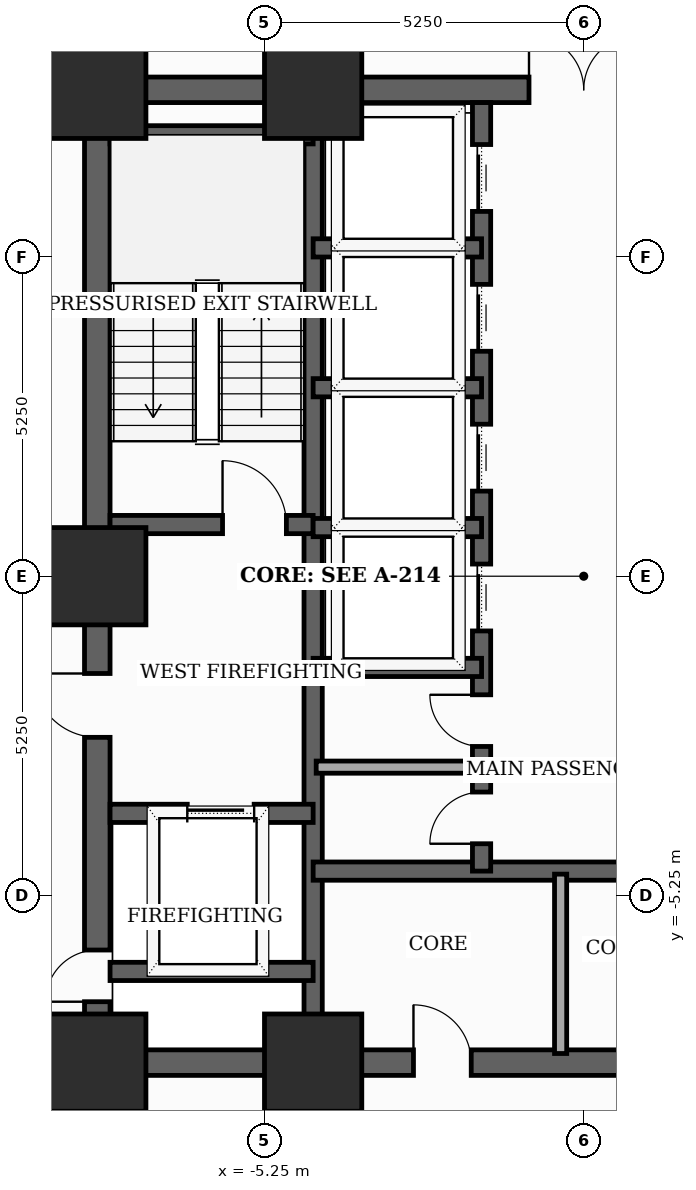
"""IFC4 building model, lengths in metres.
Left out: names, types, materials, properties, quantities, classifications, styles, units other than length and angle.
Written with IfcOpenShell. Run it as: python <this file> out.ifc"""

import sys

from ifc_helpers import new_model, si_unit, direction, frame, frame_2d, origin, origin_2d, place, context, subcontext, project, spatial, rectangle, extrude, element, fill, save


model = new_model("IFC4")
c1 = context("Model", 3, precision=1e-05, world=origin(), true_north=direction((0.0, 1.0)))
c2 = subcontext(c1, "Body", "Model", "MODEL_VIEW")
j1 = project(units=[si_unit("LENGTHUNIT", "METRE"), si_unit("PLANEANGLEUNIT", "RADIAN")], contexts=[c1])
p1 = place(None, origin())
s1 = spatial("IfcSite", under=j1, at=p1, CompositionType="ELEMENT")
p2 = place(p1, origin())
s2 = spatial("IfcBuilding", under=s1, at=p2, CompositionType="ELEMENT")
p3 = place(p2, frame((0.0, 0.0, 63.0)))
s3 = spatial("IfcBuildingStorey", under=s2, at=p3, CompositionType="ELEMENT", Elevation=63.0)
for number, where, z_axis, x_axis in (
    (1, (-8.0, -8.0, 0.0), (0.0, 0.0, 1.0), (1.0, 0.0, 0.0)),
    (2, (-4.45, -8.0, 0.0), (0.0, 0.0, 1.0), (1.0, 0.0, 0.0)),
    (3, (-4.45, 8.0, 0.0), (0.0, 0.0, 1.0), (1.0, 0.0, 0.0)),
    (4, (-8.0, 8.0, 0.0), (0.0, 0.0, 1.0), (1.0, 0.0, 0.0)),
    (5, (-8.0, 0.0, 0.0), (0.0, 0.0, 1.0), (1.0, 0.0, 0.0)),
):
    element("IfcColumn", number, at=place(p3, frame(where, z_axis=z_axis, x_axis=x_axis)), inside=s3, PredefinedType="COLUMN", context=c2, shape_type="SweptSolid", body=[
        extrude(rectangle(XDim=1.6, YDim=1.6, at=origin_2d()), origin(), (0.0, 0.0, 1.0), 3.7),
    ])
p4 = place(p3, frame((-8.0, -8.0, 0.0), z_axis=(0.0, 0.0, 1.0), x_axis=(0.0, 1.0, 0.0)))
e6 = element("IfcWall", 6, at=p4, inside=s3, PredefinedType="SHEAR", context=c2, shape_type="SweptSolid", body=[
    extrude(rectangle(XDim=16.0, YDim=0.42, at=frame_2d((8.0, 0.0))), origin(), (0.0, 0.0, 1.0), 3.5),
])
p5 = place(p4, frame((1.002, 0.0, 0.0)))
e7 = element("IfcOpeningElement", 7, at=p5, cuts=e6, PredefinedType="OPENING", context=c2, shape_type="SweptSolid", body=[
    extrude(rectangle(XDim=0.85, YDim=2.02, at=frame_2d((0.425, 1.01))), frame((0.0, 0.22, 0.0), z_axis=(0.0, -1.0, 0.0), x_axis=(1.0, 0.0, 0.0)), (0.0, 0.0, 1.0), 0.44),
])
p6 = place(p4, frame((5.35, 0.0, 0.0)))
e8 = element("IfcOpeningElement", 8, at=p6, cuts=e6, PredefinedType="OPENING", context=c2, shape_type="SweptSolid", body=[
    extrude(rectangle(XDim=1.05, YDim=2.15, at=frame_2d((0.525, 1.075))), frame((0.0, 0.22, 0.0), z_axis=(0.0, -1.0, 0.0), x_axis=(1.0, 0.0, 0.0)), (0.0, 0.0, 1.0), 0.44),
])
p7 = place(p3, frame((-8.0, -8.0, 0.0), z_axis=(0.0, 0.0, 1.0), x_axis=(1.0, 0.0, 0.0)))
e9 = element("IfcWall", 9, at=p7, inside=s3, PredefinedType="SHEAR", context=c2, shape_type="SweptSolid", body=[
    extrude(rectangle(XDim=16.0, YDim=0.42, at=frame_2d((8.0, 0.0))), origin(), (0.0, 0.0, 1.0), 3.5),
])
p8 = place(p7, frame((5.2, 0.0, 0.0)))
e10 = element("IfcOpeningElement", 10, at=p8, cuts=e9, PredefinedType="OPENING", context=c2, shape_type="SweptSolid", body=[
    extrude(rectangle(XDim=0.95, YDim=2.1, at=frame_2d((0.475, 1.05))), frame((0.0, 0.22, 0.0), z_axis=(0.0, -1.0, 0.0), x_axis=(1.0, 0.0, 0.0)), (0.0, 0.0, 1.0), 0.44),
])
p9 = place(p7, frame((9.8, 0.0, 0.0)))
e11 = element("IfcOpeningElement", 11, at=p9, cuts=e9, PredefinedType="OPENING", context=c2, shape_type="SweptSolid", body=[
    extrude(rectangle(XDim=0.95, YDim=2.1, at=frame_2d((0.475, 1.05))), frame((0.0, 0.22, 0.0), z_axis=(0.0, -1.0, 0.0), x_axis=(1.0, 0.0, 0.0)), (0.0, 0.0, 1.0), 0.44),
])
p10 = place(p3, frame((-8.0, 8.0, 0.0), z_axis=(0.0, 0.0, 1.0), x_axis=(1.0, 0.0, 0.0)))
e12 = element("IfcWall", 12, at=p10, inside=s3, PredefinedType="SHEAR", context=c2, shape_type="SweptSolid", body=[
    extrude(rectangle(XDim=16.0, YDim=0.42, at=frame_2d((8.0, 0.0))), origin(), (0.0, 0.0, 1.0), 3.5),
])
p11 = place(p10, frame((7.1, 0.0, 0.0)))
e13 = element("IfcOpeningElement", 13, at=p11, cuts=e12, PredefinedType="OPENING", context=c2, shape_type="SweptSolid", body=[
    extrude(rectangle(XDim=1.8, YDim=2.15, at=frame_2d((0.9, 1.075))), frame((0.0, 0.22, 0.0), z_axis=(0.0, -1.0, 0.0), x_axis=(1.0, 0.0, 0.0)), (0.0, 0.0, 1.0), 0.44),
])
p12 = place(p3, frame((-4.45, -7.79, 0.0), z_axis=(0.0, 0.0, 1.0), x_axis=(0.0, 1.0, 0.0)))
e14 = element("IfcWall", 14, at=p12, inside=s3, PredefinedType="SHEAR", context=c2, shape_type="SweptSolid", body=[
    extrude(rectangle(XDim=15.58, YDim=0.3, at=frame_2d((7.79, 0.0))), origin(), (0.0, 0.0, 1.0), 3.5),
])
p13 = place(p3, frame((-7.79, 0.85, 0.0), z_axis=(0.0, 0.0, 1.0), x_axis=(1.0, 0.0, 0.0)))
e15 = element("IfcWall", 15, at=p13, inside=s3, PredefinedType="SHEAR", context=c2, shape_type="SweptSolid", body=[
    extrude(rectangle(XDim=3.34, YDim=0.3, at=frame_2d((1.67, 0.0))), origin(), (0.0, 0.0, 1.0), 3.5),
])
p14 = place(p13, frame((1.85, 0.0, 0.0)))
e16 = element("IfcOpeningElement", 16, at=p14, cuts=e15, PredefinedType="OPENING", context=c2, shape_type="SweptSolid", body=[
    extrude(rectangle(XDim=1.05, YDim=2.15, at=frame_2d((0.525, 1.075))), frame((0.0, 0.16, 0.0), z_axis=(0.0, -1.0, 0.0), x_axis=(1.0, 0.0, 0.0)), (0.0, 0.0, 1.0), 0.32),
])
p15 = place(p3, frame((-7.79, 7.26, 0.0), z_axis=(0.0, 0.0, 1.0), x_axis=(1.0, 0.0, 0.0)))
e17 = element("IfcWall", 17, at=p15, inside=s3, PredefinedType="SHEAR", context=c2, shape_type="SweptSolid", body=[
    extrude(rectangle(XDim=3.34, YDim=0.3, at=frame_2d((1.67, 0.0))), origin(), (0.0, 0.0, 1.0), 3.5),
])
p16 = place(p3, frame((-7.79, -3.9, 0.0), z_axis=(0.0, 0.0, 1.0), x_axis=(1.0, 0.0, 0.0)))
e18 = element("IfcWall", 18, at=p16, inside=s3, PredefinedType="SHEAR", context=c2, shape_type="SweptSolid", body=[
    extrude(rectangle(XDim=3.34, YDim=0.3, at=frame_2d((1.67, 0.0))), origin(), (0.0, 0.0, 1.0), 3.5),
])
p17 = place(p16, frame((1.27, 0.0, 0.0)))
e19 = element("IfcOpeningElement", 19, at=p17, cuts=e18, PredefinedType="OPENING", context=c2, shape_type="SweptSolid", body=[
    extrude(rectangle(XDim=1.1, YDim=2.1, at=frame_2d((0.55, 1.05))), frame((0.0, 0.16, 0.0), z_axis=(0.0, -1.0, 0.0), x_axis=(1.0, 0.0, 0.0)), (0.0, 0.0, 1.0), 0.32),
])
p18 = place(p3, frame((-7.79, -6.5, 0.0), z_axis=(0.0, 0.0, 1.0), x_axis=(1.0, 0.0, 0.0)))
e20 = element("IfcWall", 20, at=p18, inside=s3, PredefinedType="SHEAR", context=c2, shape_type="SweptSolid", body=[
    extrude(rectangle(XDim=3.34, YDim=0.3, at=frame_2d((1.67, 0.0))), origin(), (0.0, 0.0, 1.0), 3.5),
])
p19 = place(p3, frame((-4.45, -4.85, 0.0), z_axis=(0.0, 0.0, 1.0), x_axis=(1.0, 0.0, 0.0)))
e21 = element("IfcWall", 21, at=p19, inside=s3, PredefinedType="SHEAR", context=c2, shape_type="SweptSolid", body=[
    extrude(rectangle(XDim=8.9, YDim=0.3, at=frame_2d((4.45, 0.0))), origin(), (0.0, 0.0, 1.0), 3.5),
])
p20 = place(p3, frame((-1.68, -4.85, 0.0), z_axis=(0.0, 0.0, 1.0), x_axis=(0.0, 1.0, 0.0)))
e22 = element("IfcWall", 22, at=p20, inside=s3, PredefinedType="SHEAR", context=c2, shape_type="SweptSolid", body=[
    extrude(rectangle(XDim=12.64, YDim=0.3, at=frame_2d((6.32, 0.0))), origin(), (0.0, 0.0, 1.0), 3.5),
])
p21 = place(p20, frame((3.95, 0.0, 0.0)))
e23 = element("IfcOpeningElement", 23, at=p21, cuts=e22, PredefinedType="OPENING", context=c2, shape_type="SweptSolid", body=[
    extrude(rectangle(XDim=1.1, YDim=2.1, at=frame_2d((0.55, 1.05))), frame((0.0, 0.16, 0.0), z_axis=(0.0, -1.0, 0.0), x_axis=(1.0, 0.0, 0.0)), (0.0, 0.0, 1.0), 0.32),
])
p22 = place(p20, frame((6.25, 0.0, 0.0)))
e24 = element("IfcOpeningElement", 24, at=p22, cuts=e22, PredefinedType="OPENING", context=c2, shape_type="SweptSolid", body=[
    extrude(rectangle(XDim=1.1, YDim=2.1, at=frame_2d((0.55, 1.05))), frame((0.0, 0.16, 0.0), z_axis=(0.0, -1.0, 0.0), x_axis=(1.0, 0.0, 0.0)), (0.0, 0.0, 1.0), 0.32),
])
p23 = place(p20, frame((8.55, 0.0, 0.0)))
e25 = element("IfcOpeningElement", 25, at=p23, cuts=e22, PredefinedType="OPENING", context=c2, shape_type="SweptSolid", body=[
    extrude(rectangle(XDim=1.1, YDim=2.1, at=frame_2d((0.55, 1.05))), frame((0.0, 0.16, 0.0), z_axis=(0.0, -1.0, 0.0), x_axis=(1.0, 0.0, 0.0)), (0.0, 0.0, 1.0), 0.32),
])
p24 = place(p20, frame((10.85, 0.0, 0.0)))
e26 = element("IfcOpeningElement", 26, at=p24, cuts=e22, PredefinedType="OPENING", context=c2, shape_type="SweptSolid", body=[
    extrude(rectangle(XDim=1.1, YDim=2.1, at=frame_2d((0.55, 1.05))), frame((0.0, 0.16, 0.0), z_axis=(0.0, -1.0, 0.0), x_axis=(1.0, 0.0, 0.0)), (0.0, 0.0, 1.0), 0.32),
])
p25 = place(p20, frame((0.45, 0.0, 0.0)))
e27 = element("IfcOpeningElement", 27, at=p25, cuts=e22, PredefinedType="OPENING", context=c2, shape_type="SweptSolid", body=[
    extrude(rectangle(XDim=0.85, YDim=2.02, at=frame_2d((0.425, 1.01))), frame((0.0, 0.16, 0.0), z_axis=(0.0, -1.0, 0.0), x_axis=(1.0, 0.0, 0.0)), (0.0, 0.0, 1.0), 0.32),
])
p26 = place(p20, frame((2.05, 0.0, 0.0)))
e28 = element("IfcOpeningElement", 28, at=p26, cuts=e22, PredefinedType="OPENING", context=c2, shape_type="SweptSolid", body=[
    extrude(rectangle(XDim=0.85, YDim=2.02, at=frame_2d((0.425, 1.01))), frame((0.0, 0.16, 0.0), z_axis=(0.0, -1.0, 0.0), x_axis=(1.0, 0.0, 0.0)), (0.0, 0.0, 1.0), 0.32),
])
for number, where, z_axis, x_axis in (
    (29, (-4.45, -1.5, 0.0), (0.0, 0.0, 1.0), (1.0, 0.0, 0.0)),
    (30, (-4.45, 0.8, 0.0), (0.0, 0.0, 1.0), (1.0, 0.0, 0.0)),
    (31, (-4.45, 3.1, 0.0), (0.0, 0.0, 1.0), (1.0, 0.0, 0.0)),
    (32, (-4.45, 5.4, 0.0), (0.0, 0.0, 1.0), (1.0, 0.0, 0.0)),
):
    element("IfcWall", number, at=place(p3, frame(where, z_axis=z_axis, x_axis=x_axis)), inside=s3, PredefinedType="SHEAR", context=c2, shape_type="SweptSolid", body=[
        extrude(rectangle(XDim=2.77, YDim=0.3, at=frame_2d((1.385, 0.0))), origin(), (0.0, 0.0, 1.0), 3.5),
    ])
p27 = place(p3, frame((-0.38, -7.85, 0.0), z_axis=(0.0, 0.0, 1.0), x_axis=(0.0, 1.0, 0.0)))
e33 = element("IfcWall", 33, at=p27, inside=s3, PredefinedType="SOLIDWALL", context=c2, shape_type="SweptSolid", body=[
    extrude(rectangle(XDim=2.95, YDim=0.2, at=frame_2d((1.475, 0.0))), origin(), (0.0, 0.0, 1.0), 2.885),
])
p28 = place(p3, frame((-4.4, -3.14, 0.0), z_axis=(0.0, 0.0, 1.0), x_axis=(1.0, 0.0, 0.0)))
e34 = element("IfcWall", 34, at=p28, inside=s3, PredefinedType="SOLIDWALL", context=c2, shape_type="SweptSolid", body=[
    extrude(rectangle(XDim=2.68, YDim=0.2, at=frame_2d((1.34, 0.0))), origin(), (0.0, 0.0, 1.0), 3.5),
])
p29 = place(p5, origin())
e35 = element("IfcDoor", 35, at=p29, inside=s3, OperationType="SINGLE_SWING_LEFT", PredefinedType="TRAPDOOR", context=c2, shape_type="SweptSolid", body=[
    extrude(rectangle(XDim=0.85, YDim=2.02, at=frame_2d((0.425, 1.01))), frame((0.0, 0.025, 0.0), z_axis=(0.0, -1.0, 0.0), x_axis=(1.0, 0.0, 0.0)), (0.0, 0.0, 1.0), 0.05),
])
fill(e7, e35)
p30 = place(p6, origin())
e36 = element("IfcDoor", 36, at=p30, inside=s3, OperationType="SINGLE_SWING_RIGHT", PredefinedType="DOOR", context=c2, shape_type="SweptSolid", body=[
    extrude(rectangle(XDim=1.05, YDim=2.15, at=frame_2d((0.525, 1.075))), frame((0.0, 0.025, 0.0), z_axis=(0.0, -1.0, 0.0), x_axis=(1.0, 0.0, 0.0)), (0.0, 0.0, 1.0), 0.05),
])
fill(e8, e36)
p31 = place(p8, origin())
e37 = element("IfcDoor", 37, at=p31, inside=s3, OperationType="SINGLE_SWING_LEFT", PredefinedType="DOOR", context=c2, shape_type="SweptSolid", body=[
    extrude(rectangle(XDim=0.95, YDim=2.1, at=frame_2d((0.475, 1.05))), frame((0.0, 0.025, 0.0), z_axis=(0.0, -1.0, 0.0), x_axis=(1.0, 0.0, 0.0)), (0.0, 0.0, 1.0), 0.05),
])
fill(e10, e37)
p32 = place(p11, origin())
e38 = element("IfcDoor", 38, at=p32, inside=s3, OperationType="DOUBLE_DOOR_SINGLE_SWING", PredefinedType="DOOR", context=c2, shape_type="SweptSolid", body=[
    extrude(rectangle(XDim=1.8, YDim=2.15, at=frame_2d((0.9, 1.075))), frame((0.0, 0.025, 0.0), z_axis=(0.0, -1.0, 0.0), x_axis=(1.0, 0.0, 0.0)), (0.0, 0.0, 1.0), 0.05),
])
fill(e13, e38)
p33 = place(p14, origin())
e39 = element("IfcDoor", 39, at=p33, inside=s3, OperationType="SINGLE_SWING_LEFT", PredefinedType="DOOR", context=c2, shape_type="SweptSolid", body=[
    extrude(rectangle(XDim=1.05, YDim=2.15, at=frame_2d((0.525, 1.075))), frame((0.0, 0.025, 0.0), z_axis=(0.0, -1.0, 0.0), x_axis=(1.0, 0.0, 0.0)), (0.0, 0.0, 1.0), 0.05),
])
fill(e16, e39)
p34 = place(p17, origin())
e40 = element("IfcDoor", 40, at=p34, inside=s3, OperationType="SLIDING_TO_LEFT", PredefinedType="DOOR", context=c2, shape_type="SweptSolid", body=[
    extrude(rectangle(XDim=1.1, YDim=2.1, at=frame_2d((0.55, 1.05))), frame((0.0, 0.025, 0.0), z_axis=(0.0, -1.0, 0.0), x_axis=(1.0, 0.0, 0.0)), (0.0, 0.0, 1.0), 0.05),
])
fill(e19, e40)
p35 = place(p21, origin())
e41 = element("IfcDoor", 41, at=p35, inside=s3, OperationType="SLIDING_TO_LEFT", PredefinedType="DOOR", context=c2, shape_type="SweptSolid", body=[
    extrude(rectangle(XDim=1.1, YDim=2.1, at=frame_2d((0.55, 1.05))), frame((0.0, 0.025, 0.0), z_axis=(0.0, -1.0, 0.0), x_axis=(1.0, 0.0, 0.0)), (0.0, 0.0, 1.0), 0.05),
])
fill(e23, e41)
p36 = place(p22, origin())
e42 = element("IfcDoor", 42, at=p36, inside=s3, OperationType="SLIDING_TO_LEFT", PredefinedType="DOOR", context=c2, shape_type="SweptSolid", body=[
    extrude(rectangle(XDim=1.1, YDim=2.1, at=frame_2d((0.55, 1.05))), frame((0.0, 0.025, 0.0), z_axis=(0.0, -1.0, 0.0), x_axis=(1.0, 0.0, 0.0)), (0.0, 0.0, 1.0), 0.05),
])
fill(e24, e42)
p37 = place(p23, origin())
e43 = element("IfcDoor", 43, at=p37, inside=s3, OperationType="SLIDING_TO_LEFT", PredefinedType="DOOR", context=c2, shape_type="SweptSolid", body=[
    extrude(rectangle(XDim=1.1, YDim=2.1, at=frame_2d((0.55, 1.05))), frame((0.0, 0.025, 0.0), z_axis=(0.0, -1.0, 0.0), x_axis=(1.0, 0.0, 0.0)), (0.0, 0.0, 1.0), 0.05),
])
fill(e25, e43)
p38 = place(p24, origin())
e44 = element("IfcDoor", 44, at=p38, inside=s3, OperationType="SLIDING_TO_LEFT", PredefinedType="DOOR", context=c2, shape_type="SweptSolid", body=[
    extrude(rectangle(XDim=1.1, YDim=2.1, at=frame_2d((0.55, 1.05))), frame((0.0, 0.025, 0.0), z_axis=(0.0, -1.0, 0.0), x_axis=(1.0, 0.0, 0.0)), (0.0, 0.0, 1.0), 0.05),
])
fill(e26, e44)
p39 = place(p25, origin())
e45 = element("IfcDoor", 45, at=p39, inside=s3, OperationType="SINGLE_SWING_LEFT", PredefinedType="TRAPDOOR", context=c2, shape_type="SweptSolid", body=[
    extrude(rectangle(XDim=0.85, YDim=2.02, at=frame_2d((0.425, 1.01))), frame((0.0, 0.025, 0.0), z_axis=(0.0, -1.0, 0.0), x_axis=(1.0, 0.0, 0.0)), (0.0, 0.0, 1.0), 0.05),
])
fill(e27, e45)
p40 = place(p26, origin())
e46 = element("IfcDoor", 46, at=p40, inside=s3, OperationType="SINGLE_SWING_RIGHT", PredefinedType="TRAPDOOR", context=c2, shape_type="SweptSolid", body=[
    extrude(rectangle(XDim=0.85, YDim=2.02, at=frame_2d((0.425, 1.01))), frame((0.0, 0.025, 0.0), z_axis=(0.0, -1.0, 0.0), x_axis=(1.0, 0.0, 0.0)), (0.0, 0.0, 1.0), 0.05),
])
fill(e28, e46)
save(model, sys.argv[1])
